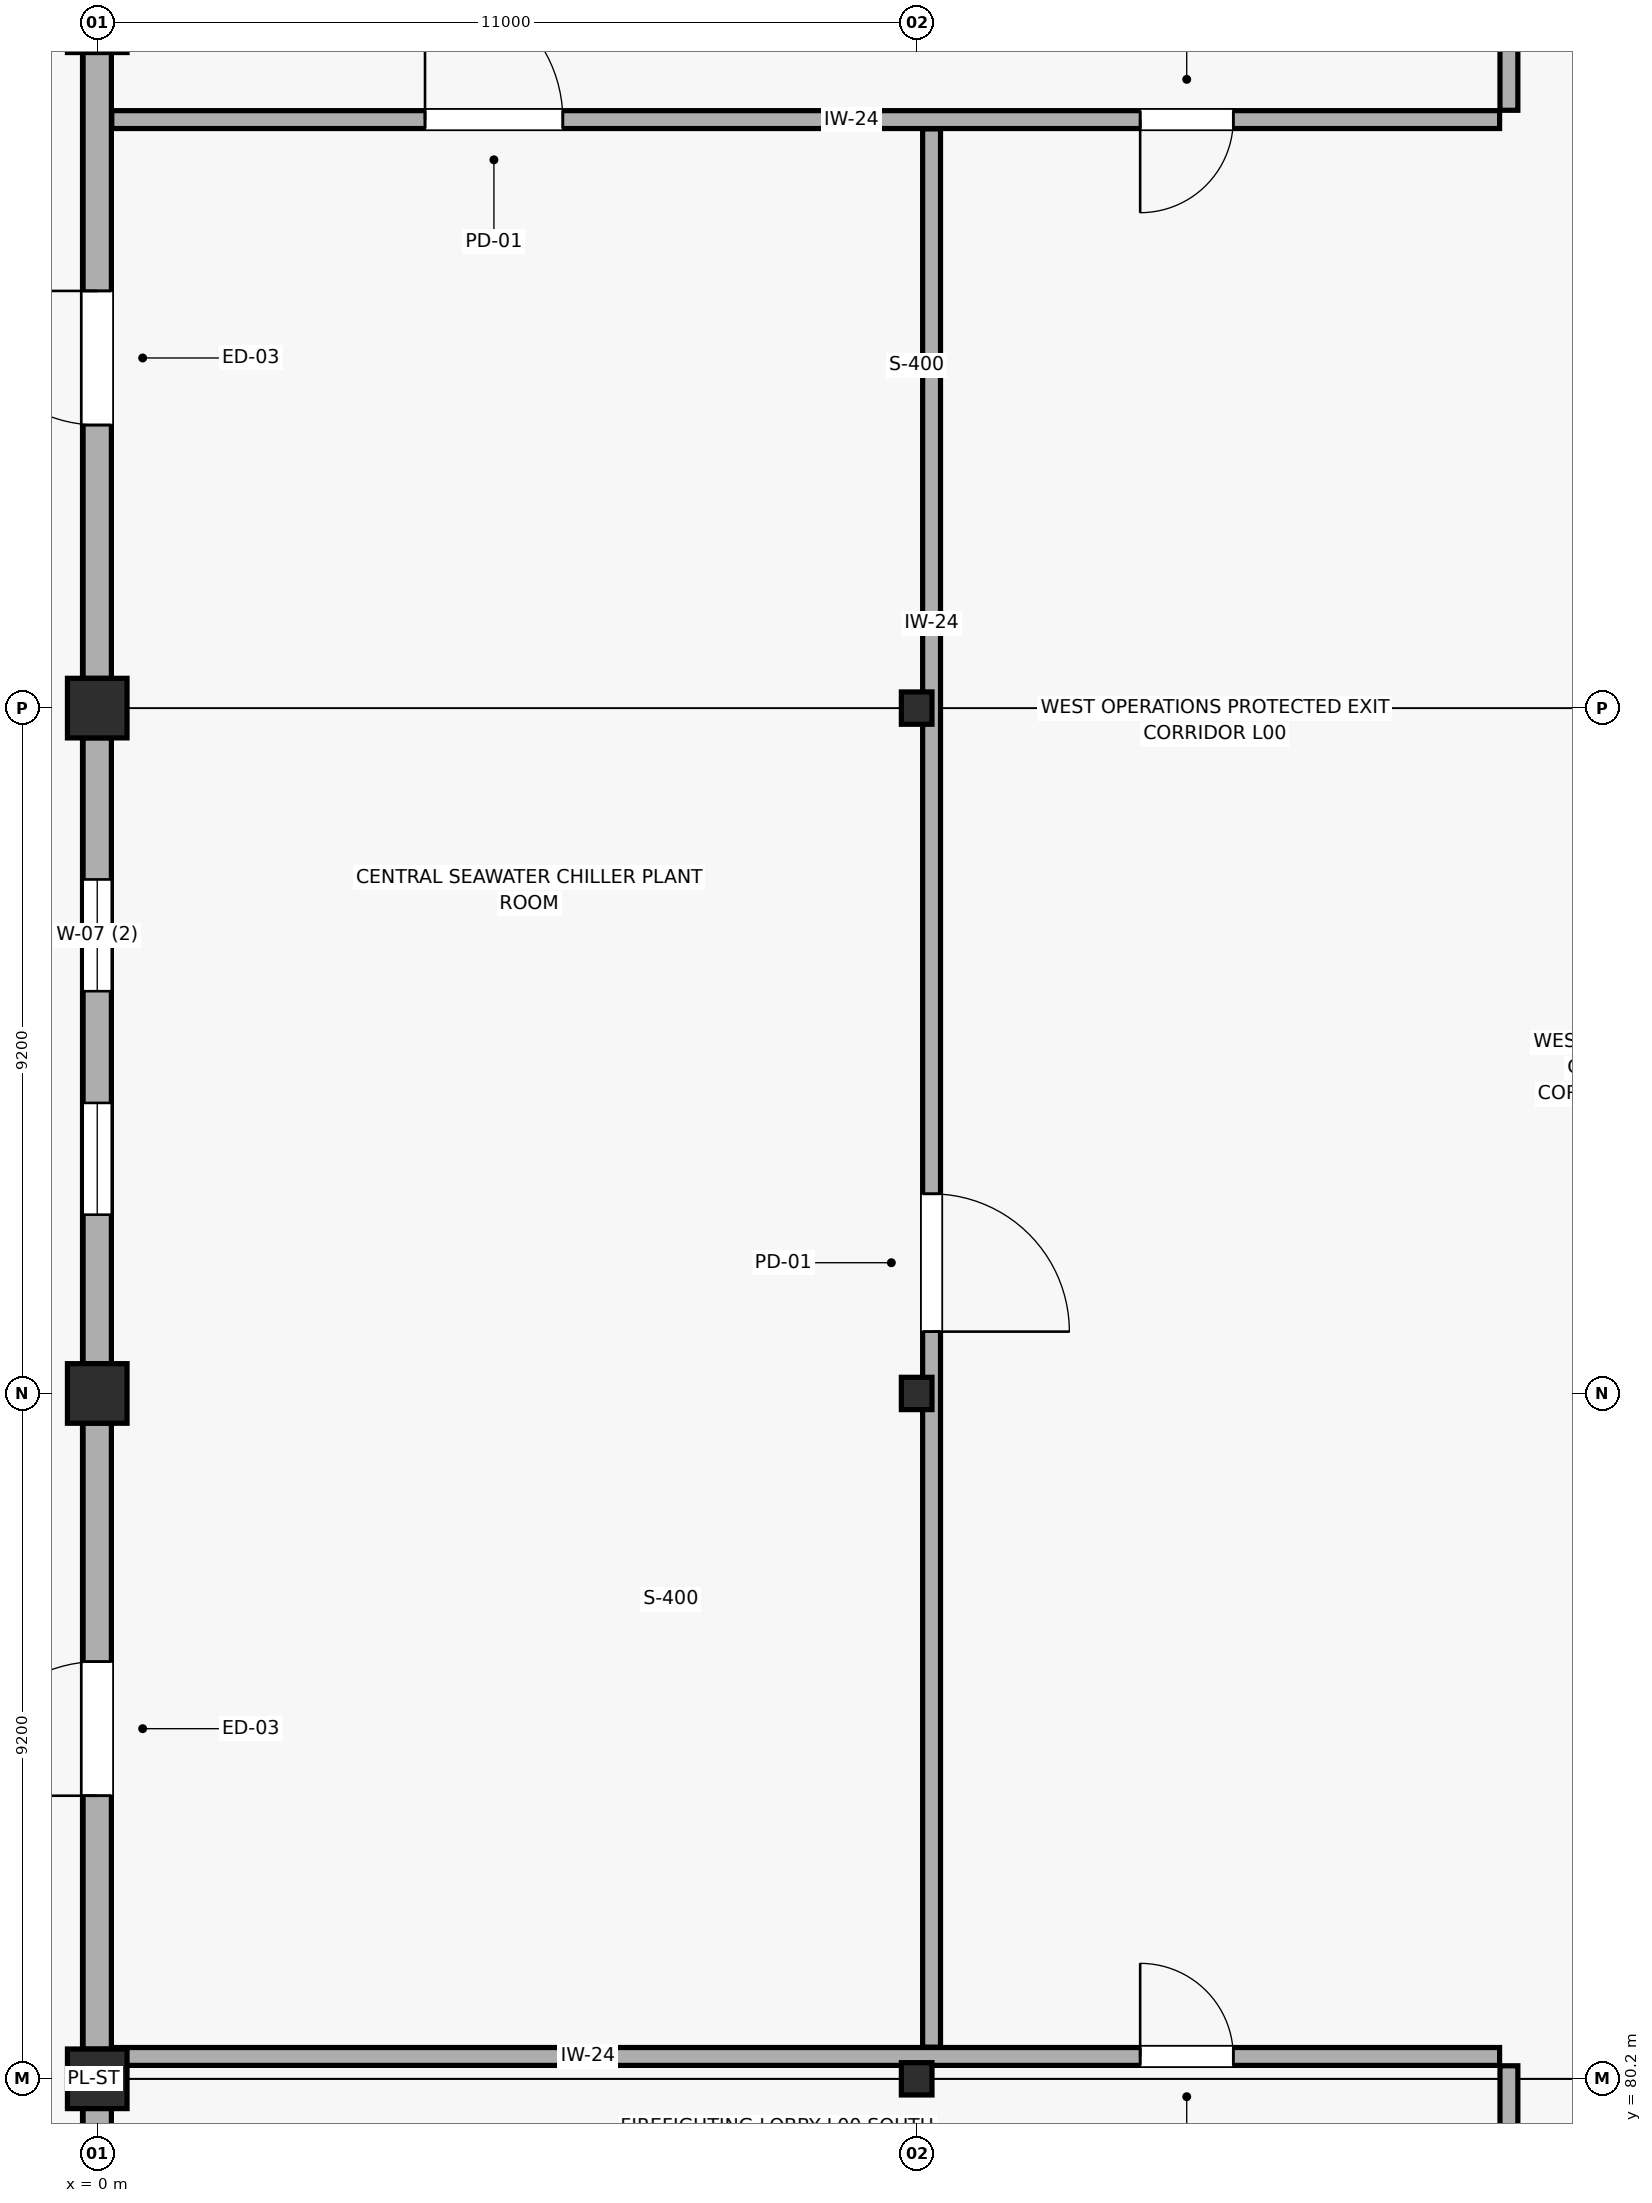
"""IFC4 building model, lengths in metres.
Left out: names, types, materials, properties, quantities, classifications, styles, units other than length and angle.
Written with IfcOpenShell. Run it as: python <this file> out.ifc"""

import sys

from ifc_helpers import new_model, si_unit, direction, frame, frame_2d, origin, origin_2d, place, context, subcontext, project, spatial, rectangle, i_section, extrude, element, fill, save


model = new_model("IFC4")
c1 = context("Model", 3, precision=1e-05, world=origin(), true_north=direction((0.0, 1.0)))
c2 = subcontext(c1, "Body", "Model", "MODEL_VIEW")
j1 = project(units=[si_unit("LENGTHUNIT", "METRE"), si_unit("PLANEANGLEUNIT", "RADIAN")], contexts=[c1])
p1 = place(None, origin())
s1 = spatial("IfcSite", under=j1, at=p1, CompositionType="ELEMENT")
p2 = place(p1, origin())
s2 = spatial("IfcBuilding", under=s1, at=p2, CompositionType="ELEMENT")
p3 = place(p2, origin())
s3 = spatial("IfcBuildingStorey", under=s2, at=p3, CompositionType="ELEMENT", Elevation=0.0)
for number, where, z_axis, x_axis in (
    (1, (0.0, 80.2, 0.0), (0.0, 0.0, 1.0), (1.0, 0.0, 0.0)),
    (2, (0.0, 89.4, 0.0), (0.0, 0.0, 1.0), (1.0, 0.0, 0.0)),
    (3, (0.0, 98.6, 0.0), (0.0, 0.0, 1.0), (1.0, 0.0, 0.0)),
):
    element("IfcColumn", number, at=place(p3, frame(where, z_axis=z_axis, x_axis=x_axis)), inside=s3, PredefinedType="COLUMN", context=c2, shape_type="SweptSolid", body=[
        extrude(rectangle(XDim=0.8, YDim=0.8, at=origin_2d()), origin(), (0.0, 0.0, 1.0), 5.4),
    ])
for number, where, z_axis, x_axis in (
    (4, (11.0, 80.2, 0.0), (0.0, 0.0, 1.0), (1.0, 0.0, 0.0)),
    (5, (11.0, 89.4, 0.0), (0.0, 0.0, 1.0), (1.0, 0.0, 0.0)),
    (6, (11.0, 98.6, 0.0), (0.0, 0.0, 1.0), (1.0, 0.0, 0.0)),
):
    element("IfcColumn", number, at=place(p3, frame(where, z_axis=z_axis, x_axis=x_axis)), inside=s3, PredefinedType="COLUMN", context=c2, shape_type="SweptSolid", body=[
        extrude(i_section(OverallWidth=0.411, OverallDepth=0.434, WebThickness=0.036, FlangeThickness=0.057, at=origin_2d()), origin(), (0.0, 0.0, 1.0), 5.4),
    ])
p4 = place(p3, frame((0.0, 79.802, 0.0), z_axis=(0.0, 0.0, 1.0), x_axis=(0.0, -1.0, 0.0)))
e7 = element("IfcWall", 7, at=p4, inside=s3, PredefinedType="SOLIDWALL", context=c2, shape_type="SweptSolid", body=[
    extrude(rectangle(XDim=7.804, YDim=0.38, at=frame_2d((3.902, 0.0))), origin(), (0.0, 0.0, 1.0), 4.525),
])
p5 = place(p4, frame((1.902, 0.0, 0.95)))
e8 = element("IfcOpeningElement", 8, at=p5, cuts=e7, PredefinedType="OPENING", context=c2, shape_type="SweptSolid", body=[
    extrude(rectangle(XDim=1.5, YDim=1.8, at=frame_2d((0.75, 0.9))), frame((0.0, 0.2, 0.0), z_axis=(0.0, -1.0, 0.0), x_axis=(1.0, 0.0, 0.0)), (0.0, 0.0, 1.0), 0.4),
])
p6 = place(p4, frame((4.902, 0.0, 0.95)))
e9 = element("IfcOpeningElement", 9, at=p6, cuts=e7, PredefinedType="OPENING", context=c2, shape_type="SweptSolid", body=[
    extrude(rectangle(XDim=1.5, YDim=1.8, at=frame_2d((0.75, 0.9))), frame((0.0, 0.2, 0.0), z_axis=(0.0, -1.0, 0.0), x_axis=(1.0, 0.0, 0.0)), (0.0, 0.0, 1.0), 0.4),
])
p7 = place(p3, frame((0.0, 89.002, 0.0), z_axis=(0.0, 0.0, 1.0), x_axis=(0.0, -1.0, 0.0)))
e10 = element("IfcWall", 10, at=p7, inside=s3, PredefinedType="SOLIDWALL", context=c2, shape_type="SweptSolid", body=[
    extrude(rectangle(XDim=8.404, YDim=0.38, at=frame_2d((4.202, 0.0))), origin(), (0.0, 0.0, 1.0), 4.525),
])
p8 = place(p7, frame((3.202, 0.0, 0.0)))
e11 = element("IfcOpeningElement", 11, at=p8, cuts=e10, PredefinedType="OPENING", context=c2, shape_type="SweptSolid", body=[
    extrude(rectangle(XDim=1.8, YDim=2.4, at=frame_2d((0.9, 1.2))), frame((0.0, 0.2, 0.0), z_axis=(0.0, -1.0, 0.0), x_axis=(1.0, 0.0, 0.0)), (0.0, 0.0, 1.0), 0.4),
])
p9 = place(p3, frame((0.0, 98.202, 0.0), z_axis=(0.0, 0.0, 1.0), x_axis=(0.0, -1.0, 0.0)))
e12 = element("IfcWall", 12, at=p9, inside=s3, PredefinedType="SOLIDWALL", context=c2, shape_type="SweptSolid", body=[
    extrude(rectangle(XDim=8.404, YDim=0.38, at=frame_2d((4.202, 0.0))), origin(), (0.0, 0.0, 1.0), 4.525),
])
p10 = place(p9, frame((1.902, 0.0, 0.95)))
e13 = element("IfcOpeningElement", 13, at=p10, cuts=e12, PredefinedType="OPENING", context=c2, shape_type="SweptSolid", body=[
    extrude(rectangle(XDim=1.5, YDim=2.25, at=frame_2d((0.75, 1.125))), frame((0.0, 0.2, 0.0), z_axis=(0.0, -1.0, 0.0), x_axis=(1.0, 0.0, 0.0)), (0.0, 0.0, 1.0), 0.4),
])
p11 = place(p9, frame((4.902, 0.0, 0.95)))
e14 = element("IfcOpeningElement", 14, at=p11, cuts=e12, PredefinedType="OPENING", context=c2, shape_type="SweptSolid", body=[
    extrude(rectangle(XDim=1.5, YDim=2.25, at=frame_2d((0.75, 1.125))), frame((0.0, 0.2, 0.0), z_axis=(0.0, -1.0, 0.0), x_axis=(1.0, 0.0, 0.0)), (0.0, 0.0, 1.0), 0.4),
])
p12 = place(p3, frame((0.0, 107.402, 0.0), z_axis=(0.0, 0.0, 1.0), x_axis=(0.0, -1.0, 0.0)))
e15 = element("IfcWall", 15, at=p12, inside=s3, PredefinedType="SOLIDWALL", context=c2, shape_type="SweptSolid", body=[
    extrude(rectangle(XDim=8.404, YDim=0.38, at=frame_2d((4.202, 0.0))), origin(), (0.0, 0.0, 1.0), 4.525),
])
p13 = place(p12, frame((3.202, 0.0, 0.0)))
e16 = element("IfcOpeningElement", 16, at=p13, cuts=e15, PredefinedType="OPENING", context=c2, shape_type="SweptSolid", body=[
    extrude(rectangle(XDim=1.8, YDim=2.4, at=frame_2d((0.9, 1.2))), frame((0.0, 0.2, 0.0), z_axis=(0.0, -1.0, 0.0), x_axis=(1.0, 0.0, 0.0)), (0.0, 0.0, 1.0), 0.4),
])
p14 = place(p3, frame((0.195, 106.5, 0.0), z_axis=(0.0, 0.0, 1.0), x_axis=(1.0, 0.0, 0.0)))
e17 = element("IfcWall", 17, at=p14, inside=s3, PredefinedType="PARTITIONING", context=c2, shape_type="SweptSolid", body=[
    extrude(rectangle(XDim=18.63, YDim=0.24, at=frame_2d((9.315, 0.0))), origin(), (0.0, 0.0, 1.0), 4.525),
])
p15 = place(p14, frame((4.205, 0.0, 0.0)))
e18 = element("IfcOpeningElement", 18, at=p15, cuts=e17, PredefinedType="OPENING", context=c2, shape_type="SweptSolid", body=[
    extrude(rectangle(XDim=1.85, YDim=2.4, at=frame_2d((0.925, 1.2))), frame((0.0, 0.13, 0.0), z_axis=(0.0, -1.0, 0.0), x_axis=(1.0, 0.0, 0.0)), (0.0, 0.0, 1.0), 0.26),
])
p16 = place(p14, frame((13.805, 0.0, 0.0)))
e19 = element("IfcOpeningElement", 19, at=p16, cuts=e17, PredefinedType="OPENING", context=c2, shape_type="SweptSolid", body=[
    extrude(rectangle(XDim=1.25, YDim=2.2, at=frame_2d((0.625, 1.1))), frame((0.0, 0.13, 0.0), z_axis=(0.0, -1.0, 0.0), x_axis=(1.0, 0.0, 0.0)), (0.0, 0.0, 1.0), 0.26),
])
p17 = place(p3, frame((0.195, 80.5, 0.0), z_axis=(0.0, 0.0, 1.0), x_axis=(1.0, 0.0, 0.0)))
e20 = element("IfcWall", 20, at=p17, inside=s3, PredefinedType="PARTITIONING", context=c2, shape_type="SweptSolid", body=[
    extrude(rectangle(XDim=18.63, YDim=0.24, at=frame_2d((9.315, 0.0))), origin(), (0.0, 0.0, 1.0), 4.425),
])
p18 = place(p17, frame((13.805, 0.0, 0.0)))
e21 = element("IfcOpeningElement", 21, at=p18, cuts=e20, PredefinedType="OPENING", context=c2, shape_type="SweptSolid", body=[
    extrude(rectangle(XDim=1.25, YDim=2.2, at=frame_2d((0.625, 1.1))), frame((0.0, 0.13, 0.0), z_axis=(0.0, -1.0, 0.0), x_axis=(1.0, 0.0, 0.0)), (0.0, 0.0, 1.0), 0.26),
])
p19 = place(p3, frame((11.2, 80.625, 0.0), z_axis=(0.0, 0.0, 1.0), x_axis=(0.0, 1.0, 0.0)))
e22 = element("IfcWall", 22, at=p19, inside=s3, PredefinedType="PARTITIONING", context=c2, shape_type="SweptSolid", body=[
    extrude(rectangle(XDim=25.75, YDim=0.24, at=frame_2d((12.875, 0.0))), origin(), (0.0, 0.0, 1.0), 4.425),
])
p20 = place(p19, frame((9.605, 0.0, 0.0)))
e23 = element("IfcOpeningElement", 23, at=p20, cuts=e22, PredefinedType="OPENING", context=c2, shape_type="SweptSolid", body=[
    extrude(rectangle(XDim=1.85, YDim=2.4, at=frame_2d((0.925, 1.2))), frame((0.0, 0.13, 0.0), z_axis=(0.0, -1.0, 0.0), x_axis=(1.0, 0.0, 0.0)), (0.0, 0.0, 1.0), 0.26),
])
p21 = place(p3, frame((18.95, 106.625, 0.0), z_axis=(0.0, 0.0, 1.0), x_axis=(0.0, 1.0, 0.0)))
e24 = element("IfcWall", 24, at=p21, inside=s3, PredefinedType="PARTITIONING", context=c2, shape_type="SweptSolid", body=[
    extrude(rectangle(XDim=3.525, YDim=0.24, at=frame_2d((1.762, 0.0))), origin(), (0.0, 0.0, 1.0), 4.425),
])
p22 = place(p21, frame((1.055, 0.0, 0.0)))
e25 = element("IfcOpeningElement", 25, at=p22, cuts=e24, PredefinedType="OPENING", context=c2, shape_type="SweptSolid", body=[
    extrude(rectangle(XDim=1.25, YDim=2.2, at=frame_2d((0.625, 1.1))), frame((0.0, 0.13, 0.0), z_axis=(0.0, -1.0, 0.0), x_axis=(1.0, 0.0, 0.0)), (0.0, 0.0, 1.0), 0.26),
])
p23 = place(p3, frame((18.95, 76.85, 0.0), z_axis=(0.0, 0.0, 1.0), x_axis=(0.0, 1.0, 0.0)))
e26 = element("IfcWall", 26, at=p23, inside=s3, PredefinedType="PARTITIONING", context=c2, shape_type="SweptSolid", body=[
    extrude(rectangle(XDim=3.525, YDim=0.24, at=frame_2d((1.762, 0.0))), origin(), (0.0, 0.0, 1.0), 4.425),
])
p24 = place(p23, frame((1.05, 0.0, 0.0)))
e27 = element("IfcOpeningElement", 27, at=p24, cuts=e26, PredefinedType="OPENING", context=c2, shape_type="SweptSolid", body=[
    extrude(rectangle(XDim=1.25, YDim=2.2, at=frame_2d((0.625, 1.1))), frame((0.0, 0.13, 0.0), z_axis=(0.0, -1.0, 0.0), x_axis=(1.0, 0.0, 0.0)), (0.0, 0.0, 1.0), 0.26),
])
p25 = place(p8, frame((1.8, 0.0, 0.0), z_axis=(0.0, 0.0, 1.0), x_axis=(-1.0, 0.0, 0.0)))
e28 = element("IfcDoor", 28, at=p25, inside=s3, OperationType="SINGLE_SWING_LEFT", PredefinedType="DOOR", context=c2, shape_type="SweptSolid", body=[
    extrude(rectangle(XDim=1.8, YDim=2.4, at=frame_2d((0.9, 1.2))), frame((0.0, 0.025, 0.0), z_axis=(0.0, -1.0, 0.0), x_axis=(1.0, 0.0, 0.0)), (0.0, 0.0, 1.0), 0.05),
])
fill(e11, e28)
p26 = place(p10, origin())
e29 = element("IfcWindow", 29, at=p26, inside=s3, PartitioningType="SINGLE_PANEL", PredefinedType="WINDOW", context=c2, shape_type="SweptSolid", body=[
    extrude(rectangle(XDim=1.5, YDim=2.25, at=frame_2d((0.75, 1.125))), frame((0.0, 0.03, 0.0), z_axis=(0.0, -1.0, 0.0), x_axis=(1.0, 0.0, 0.0)), (0.0, 0.0, 1.0), 0.06),
])
fill(e13, e29)
p27 = place(p11, origin())
e30 = element("IfcWindow", 30, at=p27, inside=s3, PartitioningType="SINGLE_PANEL", PredefinedType="WINDOW", context=c2, shape_type="SweptSolid", body=[
    extrude(rectangle(XDim=1.5, YDim=2.25, at=frame_2d((0.75, 1.125))), frame((0.0, 0.03, 0.0), z_axis=(0.0, -1.0, 0.0), x_axis=(1.0, 0.0, 0.0)), (0.0, 0.0, 1.0), 0.06),
])
fill(e14, e30)
p28 = place(p13, frame((1.8, 0.0, 0.0), z_axis=(0.0, 0.0, 1.0), x_axis=(-1.0, 0.0, 0.0)))
e31 = element("IfcDoor", 31, at=p28, inside=s3, OperationType="SINGLE_SWING_RIGHT", PredefinedType="DOOR", context=c2, shape_type="SweptSolid", body=[
    extrude(rectangle(XDim=1.8, YDim=2.4, at=frame_2d((0.9, 1.2))), frame((0.0, 0.025, 0.0), z_axis=(0.0, -1.0, 0.0), x_axis=(1.0, 0.0, 0.0)), (0.0, 0.0, 1.0), 0.05),
])
fill(e16, e31)
p29 = place(p15, origin())
e32 = element("IfcDoor", 32, at=p29, inside=s3, OperationType="SINGLE_SWING_LEFT", PredefinedType="DOOR", context=c2, shape_type="SweptSolid", body=[
    extrude(rectangle(XDim=1.85, YDim=2.4, at=frame_2d((0.925, 1.2))), frame((0.0, 0.025, 0.0), z_axis=(0.0, -1.0, 0.0), x_axis=(1.0, 0.0, 0.0)), (0.0, 0.0, 1.0), 0.05),
])
fill(e18, e32)
p30 = place(p16, frame((1.25, 0.0, 0.0), z_axis=(0.0, 0.0, 1.0), x_axis=(-1.0, 0.0, 0.0)))
e33 = element("IfcDoor", 33, at=p30, inside=s3, OperationType="SINGLE_SWING_RIGHT", PredefinedType="DOOR", context=c2, shape_type="SweptSolid", body=[
    extrude(rectangle(XDim=1.25, YDim=2.2, at=frame_2d((0.625, 1.1))), frame((0.0, 0.025, 0.0), z_axis=(0.0, -1.0, 0.0), x_axis=(1.0, 0.0, 0.0)), (0.0, 0.0, 1.0), 0.05),
])
fill(e19, e33)
p31 = place(p18, origin())
e34 = element("IfcDoor", 34, at=p31, inside=s3, OperationType="SINGLE_SWING_LEFT", PredefinedType="DOOR", context=c2, shape_type="SweptSolid", body=[
    extrude(rectangle(XDim=1.25, YDim=2.2, at=frame_2d((0.625, 1.1))), frame((0.0, 0.025, 0.0), z_axis=(0.0, -1.0, 0.0), x_axis=(1.0, 0.0, 0.0)), (0.0, 0.0, 1.0), 0.05),
])
fill(e21, e34)
p32 = place(p20, frame((1.85, 0.0, 0.0), z_axis=(0.0, 0.0, 1.0), x_axis=(-1.0, 0.0, 0.0)))
e35 = element("IfcDoor", 35, at=p32, inside=s3, OperationType="SINGLE_SWING_RIGHT", PredefinedType="DOOR", context=c2, shape_type="SweptSolid", body=[
    extrude(rectangle(XDim=1.85, YDim=2.4, at=frame_2d((0.925, 1.2))), frame((0.0, 0.025, 0.0), z_axis=(0.0, -1.0, 0.0), x_axis=(1.0, 0.0, 0.0)), (0.0, 0.0, 1.0), 0.05),
])
fill(e23, e35)
save(model, sys.argv[1])
